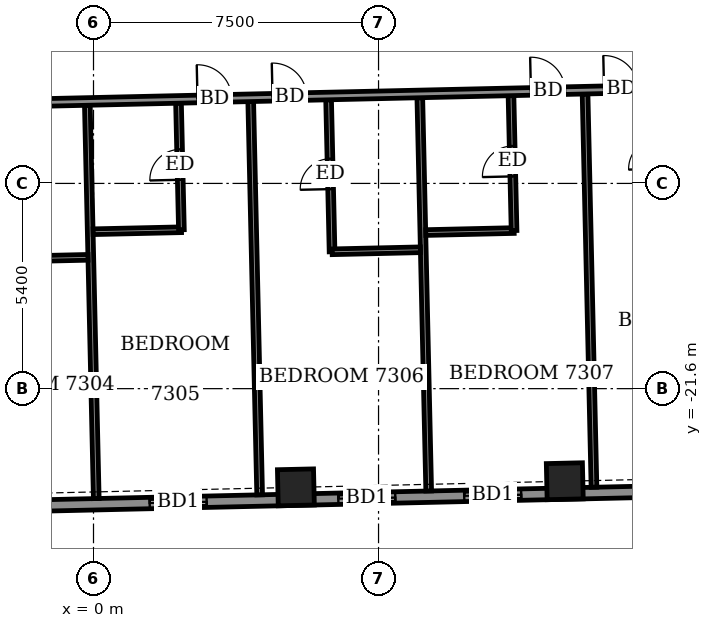
"""IFC4 building model, lengths in metres.
Left out: names, types, materials, properties, quantities, classifications, styles, units other than length and angle.
Written with IfcOpenShell. Run it as: python <this file> out.ifc"""

import sys

from ifc_helpers import new_model, si_unit, direction, frame, frame_2d, origin, origin_2d, place, context, subcontext, project, spatial, rectangle, extrude, element, fill, save


model = new_model("IFC4")
c1 = context("Model", 3, precision=1e-05, world=origin(), true_north=direction((0.0, 1.0)))
c2 = subcontext(c1, "Body", "Model", "MODEL_VIEW")
j1 = project(units=[si_unit("LENGTHUNIT", "METRE"), si_unit("PLANEANGLEUNIT", "RADIAN")], contexts=[c1])
p1 = place(None, origin())
s1 = spatial("IfcSite", under=j1, at=p1, CompositionType="ELEMENT")
p2 = place(p1, origin())
s2 = spatial("IfcBuilding", under=s1, at=p2, CompositionType="ELEMENT")
p3 = place(p2, frame((0.0, 0.0, 287.1)))
s3 = spatial("IfcBuildingStorey", under=s2, at=p3, CompositionType="ELEMENT", Elevation=287.1)
for number, where, z_axis, x_axis in (
    (1, (5.325, -24.197, -0.55), (0.0, 0.0, 1.0), (1.0, 0.023, 0.0)),
    (2, (12.4, -24.036, -0.55), (0.0, 0.0, 1.0), (1.0, 0.023, 0.0)),
):
    element("IfcColumn", number, at=place(p3, frame(where, z_axis=z_axis, x_axis=x_axis)), inside=s3, PredefinedType="COLUMN", context=c2, shape_type="SweptSolid", body=[
        extrude(rectangle(XDim=0.95, YDim=0.95, at=origin_2d()), origin(), (0.0, 0.0, 1.0), 3.6),
    ])
p4 = place(p3, frame((-22.816, -25.161, 0.0), z_axis=(0.0, 0.0, 1.0), x_axis=(0.999742646411, 0.022685699159, 0.0)))
e3 = element("IfcWall", 3, at=p4, inside=s3, PredefinedType="SOLIDWALL", context=c2, shape_type="SweptSolid", body=[
    extrude(rectangle(XDim=49.236, YDim=0.3, at=frame_2d((24.618, 0.0))), origin(), (0.0, 0.0, 1.0), 2.5),
])
p5 = place(p4, frame((2.277, 0.0, 0.0)))
e4 = element("IfcOpeningElement", 4, at=p5, cuts=e3, PredefinedType="OPENING", context=c2, shape_type="SweptSolid", body=[
    extrude(rectangle(XDim=1.5, YDim=2.4, at=frame_2d((0.75, 1.2))), frame((0.0, 0.16, 0.0), z_axis=(0.0, -1.0, 0.0), x_axis=(1.0, 0.0, 0.0)), (0.0, 0.0, 1.0), 0.32),
])
p6 = place(p4, frame((7.726, 0.0, 0.0)))
e5 = element("IfcOpeningElement", 5, at=p6, cuts=e3, PredefinedType="OPENING", context=c2, shape_type="SweptSolid", body=[
    extrude(rectangle(XDim=1.5, YDim=2.4, at=frame_2d((0.75, 1.2))), frame((0.0, 0.16, 0.0), z_axis=(0.0, -1.0, 0.0), x_axis=(1.0, 0.0, 0.0)), (0.0, 0.0, 1.0), 0.32),
])
p7 = place(p4, frame((11.039, 0.0, 0.0)))
e6 = element("IfcOpeningElement", 6, at=p7, cuts=e3, PredefinedType="OPENING", context=c2, shape_type="SweptSolid", body=[
    extrude(rectangle(XDim=1.5, YDim=2.4, at=frame_2d((0.75, 1.2))), frame((0.0, 0.16, 0.0), z_axis=(0.0, -1.0, 0.0), x_axis=(1.0, 0.0, 0.0)), (0.0, 0.0, 1.0), 0.32),
])
p8 = place(p4, frame((15.589, 0.0, 0.0)))
e7 = element("IfcOpeningElement", 7, at=p8, cuts=e3, PredefinedType="OPENING", context=c2, shape_type="SweptSolid", body=[
    extrude(rectangle(XDim=1.5, YDim=2.4, at=frame_2d((0.75, 1.2))), frame((0.0, 0.16, 0.0), z_axis=(0.0, -1.0, 0.0), x_axis=(1.0, 0.0, 0.0)), (0.0, 0.0, 1.0), 0.32),
])
p9 = place(p4, frame((18.903, 0.0, 0.0)))
e8 = element("IfcOpeningElement", 8, at=p9, cuts=e3, PredefinedType="OPENING", context=c2, shape_type="SweptSolid", body=[
    extrude(rectangle(XDim=1.5, YDim=2.4, at=frame_2d((0.75, 1.2))), frame((0.0, 0.16, 0.0), z_axis=(0.0, -1.0, 0.0), x_axis=(1.0, 0.0, 0.0)), (0.0, 0.0, 1.0), 0.32),
])
p10 = place(p4, frame((24.3, 0.0, 0.0)))
e9 = element("IfcOpeningElement", 9, at=p10, cuts=e3, PredefinedType="OPENING", context=c2, shape_type="SweptSolid", body=[
    extrude(rectangle(XDim=1.5, YDim=2.4, at=frame_2d((0.75, 1.2))), frame((0.0, 0.16, 0.0), z_axis=(0.0, -1.0, 0.0), x_axis=(1.0, 0.0, 0.0)), (0.0, 0.0, 1.0), 0.32),
])
p11 = place(p4, frame((29.265, 0.0, 0.0)))
e10 = element("IfcOpeningElement", 10, at=p11, cuts=e3, PredefinedType="OPENING", context=c2, shape_type="SweptSolid", body=[
    extrude(rectangle(XDim=1.5, YDim=2.4, at=frame_2d((0.75, 1.2))), frame((0.0, 0.16, 0.0), z_axis=(0.0, -1.0, 0.0), x_axis=(1.0, 0.0, 0.0)), (0.0, 0.0, 1.0), 0.32),
])
p12 = place(p4, frame((32.579, 0.0, 0.0)))
e11 = element("IfcOpeningElement", 11, at=p12, cuts=e3, PredefinedType="OPENING", context=c2, shape_type="SweptSolid", body=[
    extrude(rectangle(XDim=1.5, YDim=2.4, at=frame_2d((0.75, 1.2))), frame((0.0, 0.16, 0.0), z_axis=(0.0, -1.0, 0.0), x_axis=(1.0, 0.0, 0.0)), (0.0, 0.0, 1.0), 0.32),
])
p13 = place(p4, frame((37.4, 0.0, 0.0)))
e12 = element("IfcOpeningElement", 12, at=p13, cuts=e3, PredefinedType="OPENING", context=c2, shape_type="SweptSolid", body=[
    extrude(rectangle(XDim=1.5, YDim=2.4, at=frame_2d((0.75, 1.2))), frame((0.0, 0.16, 0.0), z_axis=(0.0, -1.0, 0.0), x_axis=(1.0, 0.0, 0.0)), (0.0, 0.0, 1.0), 0.32),
])
p14 = place(p4, frame((42.967, 0.0, 0.0)))
e13 = element("IfcOpeningElement", 13, at=p14, cuts=e3, PredefinedType="OPENING", context=c2, shape_type="SweptSolid", body=[
    extrude(rectangle(XDim=1.2, YDim=2.4, at=frame_2d((0.6, 1.2))), frame((0.0, 0.16, 0.0), z_axis=(0.0, -1.0, 0.0), x_axis=(1.0, 0.0, 0.0)), (0.0, 0.0, 1.0), 0.32),
])
p15 = place(p4, frame((45.421, 0.0, 0.9)))
e14 = element("IfcOpeningElement", 14, at=p15, cuts=e3, PredefinedType="OPENING", context=c2, shape_type="SweptSolid", body=[
    extrude(rectangle(XDim=2.4, YDim=1.5, at=frame_2d((1.2, 0.75))), frame((0.0, 0.16, 0.0), z_axis=(0.0, -1.0, 0.0), x_axis=(1.0, 0.0, 0.0)), (0.0, 0.0, 1.0), 0.32),
])
p16 = place(p3, frame((0.073, -24.492, 0.0), z_axis=(0.0, 0.0, 1.0), x_axis=(-0.022714440015, 0.999741993824, 0.0)))
e15 = element("IfcWall", 15, at=p16, inside=s3, PredefinedType="PARTITIONING", context=c2, shape_type="SweptSolid", body=[
    extrude(rectangle(XDim=10.351, YDim=0.15, at=frame_2d((5.175, 0.0))), origin(), (0.0, 0.0, 1.0), 2.5),
])
p17 = place(p3, frame((4.372, -24.394, 0.0), z_axis=(0.0, 0.0, 1.0), x_axis=(-0.022713904397, 0.999742005993, 0.0)))
e16 = element("IfcWall", 16, at=p17, inside=s3, PredefinedType="PARTITIONING", context=c2, shape_type="SweptSolid", body=[
    extrude(rectangle(XDim=10.351, YDim=0.15, at=frame_2d((5.175, 0.0))), origin(), (0.0, 0.0, 1.0), 2.5),
])
p18 = place(p3, frame((8.82, -24.293, 0.0), z_axis=(0.0, 0.0, 1.0), x_axis=(-0.022622273571, 0.999744083623, 0.0)))
e17 = element("IfcWall", 17, at=p18, inside=s3, PredefinedType="PARTITIONING", context=c2, shape_type="SweptSolid", body=[
    extrude(rectangle(XDim=10.35, YDim=0.15, at=frame_2d((5.175, 0.0))), origin(), (0.0, 0.0, 1.0), 2.5),
])
p19 = place(p3, frame((13.169, -24.194, 0.0), z_axis=(0.0, 0.0, 1.0), x_axis=(-0.022692470342, 0.99974249274, 0.0)))
e18 = element("IfcWall", 18, at=p19, inside=s3, PredefinedType="PARTITIONING", context=c2, shape_type="SweptSolid", body=[
    extrude(rectangle(XDim=10.35, YDim=0.15, at=frame_2d((5.175, 0.0))), origin(), (0.0, 0.0, 1.0), 2.5),
])
p20 = place(p3, frame((-2.469, -18.197, 0.0), z_axis=(0.0, 0.0, 1.0), x_axis=(0.999749954681, 0.022361308448, 0.0)))
e19 = element("IfcWall", 19, at=p20, inside=s3, PredefinedType="PARTITIONING", context=c2, shape_type="SweptSolid", body=[
    extrude(rectangle(XDim=2.325, YDim=0.15, at=frame_2d((1.163, 0.0))), origin(), (0.0, 0.0, 1.0), 3.05),
])
p21 = place(p3, frame((6.277, -17.999, 0.0), z_axis=(0.0, 0.0, 1.0), x_axis=(-0.022765770952, 0.999740826251, 0.0)))
e20 = element("IfcWall", 20, at=p21, inside=s3, PredefinedType="PARTITIONING", context=c2, shape_type="SweptSolid", body=[
    extrude(rectangle(XDim=4.0, YDim=0.15, at=frame_2d((2.0, 0.0))), origin(), (0.0, 0.0, 1.0), 3.05),
])
p22 = place(p21, frame((1.65, 0.0, 0.0)))
e21 = element("IfcOpeningElement", 21, at=p22, cuts=e20, PredefinedType="OPENING", context=c2, shape_type="SweptSolid", body=[
    extrude(rectangle(XDim=0.8, YDim=2.1, at=frame_2d((0.4, 1.05))), frame((0.0, 0.085, 0.0), z_axis=(0.0, -1.0, 0.0), x_axis=(1.0, 0.0, 0.0)), (0.0, 0.0, 1.0), 0.17),
])
p23 = place(p3, frame((6.279, -17.999, 0.0), z_axis=(0.0, 0.0, 1.0), x_axis=(0.999740260747, 0.02279059109, 0.0)))
e22 = element("IfcWall", 22, at=p23, inside=s3, PredefinedType="PARTITIONING", context=c2, shape_type="SweptSolid", body=[
    extrude(rectangle(XDim=2.324, YDim=0.15, at=frame_2d((1.162, 0.0))), origin(), (0.0, 0.0, 1.0), 3.05),
])
p24 = place(p3, frame((8.743, -17.493, 0.0), z_axis=(0.0, 0.0, 1.0), x_axis=(0.99974053329, 0.022778632478, 0.0)))
e23 = element("IfcWall", 23, at=p24, inside=s3, PredefinedType="PARTITIONING", context=c2, shape_type="SweptSolid", body=[
    extrude(rectangle(XDim=2.326, YDim=0.15, at=frame_2d((1.163, 0.0))), origin(), (0.0, 0.0, 1.0), 3.05),
])
p25 = place(p3, frame((11.066, -17.44, 0.0), z_axis=(0.0, 0.0, 1.0), x_axis=(-0.022765149847, 0.999740840394, 0.0)))
e24 = element("IfcWall", 24, at=p25, inside=s3, PredefinedType="PARTITIONING", context=c2, shape_type="SweptSolid", body=[
    extrude(rectangle(XDim=3.55, YDim=0.15, at=frame_2d((1.775, 0.0))), origin(), (0.0, 0.0, 1.0), 3.05),
])
p26 = place(p25, frame((1.425, 0.0, 0.0)))
e25 = element("IfcOpeningElement", 25, at=p26, cuts=e24, PredefinedType="OPENING", context=c2, shape_type="SweptSolid", body=[
    extrude(rectangle(XDim=0.8, YDim=2.1, at=frame_2d((0.4, 1.05))), frame((0.0, 0.085, 0.0), z_axis=(0.0, -1.0, 0.0), x_axis=(1.0, 0.0, 0.0)), (0.0, 0.0, 1.0), 0.17),
])
p27 = place(p3, frame((-0.01, -17.471, 0.0), z_axis=(0.0, 0.0, 1.0), x_axis=(0.999749954681, 0.022361308448, 0.0)))
e26 = element("IfcWall", 26, at=p27, inside=s3, PredefinedType="PARTITIONING", context=c2, shape_type="SweptSolid", body=[
    extrude(rectangle(XDim=2.325, YDim=0.15, at=frame_2d((1.163, 0.0))), origin(), (0.0, 0.0, 1.0), 3.05),
])
p28 = place(p3, frame((2.313, -17.419, 0.0), z_axis=(0.0, 0.0, 1.0), x_axis=(-0.02280301672, 0.999739977408, 0.0)))
e27 = element("IfcWall", 27, at=p28, inside=s3, PredefinedType="PARTITIONING", context=c2, shape_type="SweptSolid", body=[
    extrude(rectangle(XDim=3.33, YDim=0.15, at=frame_2d((1.665, 0.0))), origin(), (0.0, 0.0, 1.0), 3.05),
])
p29 = place(p28, frame((1.315, 0.0, 0.0)))
e28 = element("IfcOpeningElement", 28, at=p29, cuts=e27, PredefinedType="OPENING", context=c2, shape_type="SweptSolid", body=[
    extrude(rectangle(XDim=0.8, YDim=2.1, at=frame_2d((0.4, 1.05))), frame((0.0, 0.085, 0.0), z_axis=(0.0, -1.0, 0.0), x_axis=(1.0, 0.0, 0.0)), (0.0, 0.0, 1.0), 0.17),
])
p30 = place(p3, frame((-25.731, -14.624, 0.0), z_axis=(0.0, 0.0, 1.0), x_axis=(0.999742799525, 0.022678950563, 0.0)))
e29 = element("IfcWall", 29, at=p30, inside=s3, PredefinedType="PARTITIONING", context=c2, shape_type="SweptSolid", body=[
    extrude(rectangle(XDim=55.386, YDim=0.2, at=frame_2d((27.693, 0.0))), origin(), (0.0, 0.0, 1.0), 3.05),
])
p31 = place(p30, frame((3.149, 0.0, 0.0)))
e30 = element("IfcOpeningElement", 30, at=p31, cuts=e29, PredefinedType="OPENING", context=c2, shape_type="SweptSolid", body=[
    extrude(rectangle(XDim=1.0, YDim=2.1, at=frame_2d((0.5, 1.05))), frame((0.0, 0.11, 0.0), z_axis=(0.0, -1.0, 0.0), x_axis=(1.0, 0.0, 0.0)), (0.0, 0.0, 1.0), 0.22),
])
p32 = place(p30, frame((11.1, 0.0, 0.0)))
e31 = element("IfcOpeningElement", 31, at=p32, cuts=e29, PredefinedType="OPENING", context=c2, shape_type="SweptSolid", body=[
    extrude(rectangle(XDim=0.9, YDim=2.1, at=frame_2d((0.45, 1.05))), frame((0.0, 0.11, 0.0), z_axis=(0.0, -1.0, 0.0), x_axis=(1.0, 0.0, 0.0)), (0.0, 0.0, 1.0), 0.22),
])
p33 = place(p30, frame((12.95, 0.0, 0.0)))
e32 = element("IfcOpeningElement", 32, at=p33, cuts=e29, PredefinedType="OPENING", context=c2, shape_type="SweptSolid", body=[
    extrude(rectangle(XDim=0.9, YDim=2.1, at=frame_2d((0.45, 1.05))), frame((0.0, 0.11, 0.0), z_axis=(0.0, -1.0, 0.0), x_axis=(1.0, 0.0, 0.0)), (0.0, 0.0, 1.0), 0.22),
])
p34 = place(p30, frame((19.675, 0.0, 0.0)))
e33 = element("IfcOpeningElement", 33, at=p34, cuts=e29, PredefinedType="OPENING", context=c2, shape_type="SweptSolid", body=[
    extrude(rectangle(XDim=0.9, YDim=2.1, at=frame_2d((0.45, 1.05))), frame((0.0, 0.11, 0.0), z_axis=(0.0, -1.0, 0.0), x_axis=(1.0, 0.0, 0.0)), (0.0, 0.0, 1.0), 0.22),
])
p35 = place(p30, frame((21.7, 0.0, 0.0)))
e34 = element("IfcOpeningElement", 34, at=p35, cuts=e29, PredefinedType="OPENING", context=c2, shape_type="SweptSolid", body=[
    extrude(rectangle(XDim=0.9, YDim=2.1, at=frame_2d((0.45, 1.05))), frame((0.0, 0.11, 0.0), z_axis=(0.0, -1.0, 0.0), x_axis=(1.0, 0.0, 0.0)), (0.0, 0.0, 1.0), 0.22),
])
p36 = place(p30, frame((28.475, 0.0, 0.0)))
e35 = element("IfcOpeningElement", 35, at=p36, cuts=e29, PredefinedType="OPENING", context=c2, shape_type="SweptSolid", body=[
    extrude(rectangle(XDim=0.9, YDim=2.1, at=frame_2d((0.45, 1.05))), frame((0.0, 0.11, 0.0), z_axis=(0.0, -1.0, 0.0), x_axis=(1.0, 0.0, 0.0)), (0.0, 0.0, 1.0), 0.22),
])
p37 = place(p30, frame((30.45, 0.0, 0.0)))
e36 = element("IfcOpeningElement", 36, at=p37, cuts=e29, PredefinedType="OPENING", context=c2, shape_type="SweptSolid", body=[
    extrude(rectangle(XDim=0.9, YDim=2.1, at=frame_2d((0.45, 1.05))), frame((0.0, 0.11, 0.0), z_axis=(0.0, -1.0, 0.0), x_axis=(1.0, 0.0, 0.0)), (0.0, 0.0, 1.0), 0.22),
])
p38 = place(p30, frame((37.25, 0.0, 0.0)))
e37 = element("IfcOpeningElement", 37, at=p38, cuts=e29, PredefinedType="OPENING", context=c2, shape_type="SweptSolid", body=[
    extrude(rectangle(XDim=0.9, YDim=2.1, at=frame_2d((0.45, 1.05))), frame((0.0, 0.11, 0.0), z_axis=(0.0, -1.0, 0.0), x_axis=(1.0, 0.0, 0.0)), (0.0, 0.0, 1.0), 0.22),
])
p39 = place(p30, frame((39.175, 0.0, 0.0)))
e38 = element("IfcOpeningElement", 38, at=p39, cuts=e29, PredefinedType="OPENING", context=c2, shape_type="SweptSolid", body=[
    extrude(rectangle(XDim=0.9, YDim=2.1, at=frame_2d((0.45, 1.05))), frame((0.0, 0.11, 0.0), z_axis=(0.0, -1.0, 0.0), x_axis=(1.0, 0.0, 0.0)), (0.0, 0.0, 1.0), 0.22),
])
p40 = place(p30, frame((45.875, 0.0, 0.0)))
e39 = element("IfcOpeningElement", 39, at=p40, cuts=e29, PredefinedType="OPENING", context=c2, shape_type="SweptSolid", body=[
    extrude(rectangle(XDim=0.9, YDim=2.1, at=frame_2d((0.45, 1.05))), frame((0.0, 0.11, 0.0), z_axis=(0.0, -1.0, 0.0), x_axis=(1.0, 0.0, 0.0)), (0.0, 0.0, 1.0), 0.22),
])
p41 = place(p30, frame((51.127, 0.0, 0.0)))
e40 = element("IfcOpeningElement", 40, at=p41, cuts=e29, PredefinedType="OPENING", context=c2, shape_type="SweptSolid", body=[
    extrude(rectangle(XDim=1.0, YDim=2.1, at=frame_2d((0.5, 1.05))), frame((0.0, 0.11, 0.0), z_axis=(0.0, -1.0, 0.0), x_axis=(1.0, 0.0, 0.0)), (0.0, 0.0, 1.0), 0.22),
])
p42 = place(p10, origin())
e41 = element("IfcDoor", 41, at=p42, inside=s3, OperationType="SLIDING_TO_LEFT", PredefinedType="DOOR", context=c2, shape_type="SweptSolid", body=[
    extrude(rectangle(XDim=1.5, YDim=2.4, at=frame_2d((0.75, 1.2))), frame((0.0, 0.025, 0.0), z_axis=(0.0, -1.0, 0.0), x_axis=(1.0, 0.0, 0.0)), (0.0, 0.0, 1.0), 0.05),
])
fill(e9, e41)
p43 = place(p11, origin())
e42 = element("IfcDoor", 42, at=p43, inside=s3, OperationType="SLIDING_TO_LEFT", PredefinedType="DOOR", context=c2, shape_type="SweptSolid", body=[
    extrude(rectangle(XDim=1.5, YDim=2.4, at=frame_2d((0.75, 1.2))), frame((0.0, 0.025, 0.0), z_axis=(0.0, -1.0, 0.0), x_axis=(1.0, 0.0, 0.0)), (0.0, 0.0, 1.0), 0.05),
])
fill(e10, e42)
p44 = place(p12, origin())
e43 = element("IfcDoor", 43, at=p44, inside=s3, OperationType="SLIDING_TO_LEFT", PredefinedType="DOOR", context=c2, shape_type="SweptSolid", body=[
    extrude(rectangle(XDim=1.5, YDim=2.4, at=frame_2d((0.75, 1.2))), frame((0.0, 0.025, 0.0), z_axis=(0.0, -1.0, 0.0), x_axis=(1.0, 0.0, 0.0)), (0.0, 0.0, 1.0), 0.05),
])
fill(e11, e43)
p45 = place(p36, origin())
e44 = element("IfcDoor", 44, at=p45, inside=s3, OperationType="SINGLE_SWING_LEFT", PredefinedType="DOOR", context=c2, shape_type="SweptSolid", body=[
    extrude(rectangle(XDim=0.9, YDim=2.1, at=frame_2d((0.45, 1.05))), frame((0.0, 0.025, 0.0), z_axis=(0.0, -1.0, 0.0), x_axis=(1.0, 0.0, 0.0)), (0.0, 0.0, 1.0), 0.05),
])
fill(e35, e44)
p46 = place(p29, origin())
e45 = element("IfcDoor", 45, at=p46, inside=s3, OperationType="SINGLE_SWING_LEFT", PredefinedType="DOOR", context=c2, shape_type="SweptSolid", body=[
    extrude(rectangle(XDim=0.8, YDim=2.1, at=frame_2d((0.4, 1.05))), frame((0.0, 0.025, 0.0), z_axis=(0.0, -1.0, 0.0), x_axis=(1.0, 0.0, 0.0)), (0.0, 0.0, 1.0), 0.05),
])
fill(e28, e45)
p47 = place(p37, origin())
e46 = element("IfcDoor", 46, at=p47, inside=s3, OperationType="SINGLE_SWING_RIGHT", PredefinedType="DOOR", context=c2, shape_type="SweptSolid", body=[
    extrude(rectangle(XDim=0.9, YDim=2.1, at=frame_2d((0.45, 1.05))), frame((0.0, 0.025, 0.0), z_axis=(0.0, -1.0, 0.0), x_axis=(1.0, 0.0, 0.0)), (0.0, 0.0, 1.0), 0.05),
])
fill(e36, e46)
p48 = place(p22, origin())
e47 = element("IfcDoor", 47, at=p48, inside=s3, OperationType="SINGLE_SWING_RIGHT", PredefinedType="DOOR", context=c2, shape_type="SweptSolid", body=[
    extrude(rectangle(XDim=0.8, YDim=2.1, at=frame_2d((0.4, 1.05))), frame((0.0, 0.025, 0.0), z_axis=(0.0, -1.0, 0.0), x_axis=(1.0, 0.0, 0.0)), (0.0, 0.0, 1.0), 0.05),
])
fill(e21, e47)
p49 = place(p38, origin())
e48 = element("IfcDoor", 48, at=p49, inside=s3, OperationType="SINGLE_SWING_LEFT", PredefinedType="DOOR", context=c2, shape_type="SweptSolid", body=[
    extrude(rectangle(XDim=0.9, YDim=2.1, at=frame_2d((0.45, 1.05))), frame((0.0, 0.025, 0.0), z_axis=(0.0, -1.0, 0.0), x_axis=(1.0, 0.0, 0.0)), (0.0, 0.0, 1.0), 0.05),
])
fill(e37, e48)
p50 = place(p26, origin())
e49 = element("IfcDoor", 49, at=p50, inside=s3, OperationType="SINGLE_SWING_LEFT", PredefinedType="DOOR", context=c2, shape_type="SweptSolid", body=[
    extrude(rectangle(XDim=0.8, YDim=2.1, at=frame_2d((0.4, 1.05))), frame((0.0, 0.025, 0.0), z_axis=(0.0, -1.0, 0.0), x_axis=(1.0, 0.0, 0.0)), (0.0, 0.0, 1.0), 0.05),
])
fill(e25, e49)
p51 = place(p39, origin())
e50 = element("IfcDoor", 50, at=p51, inside=s3, OperationType="SINGLE_SWING_RIGHT", PredefinedType="DOOR", context=c2, shape_type="SweptSolid", body=[
    extrude(rectangle(XDim=0.9, YDim=2.1, at=frame_2d((0.45, 1.05))), frame((0.0, 0.025, 0.0), z_axis=(0.0, -1.0, 0.0), x_axis=(1.0, 0.0, 0.0)), (0.0, 0.0, 1.0), 0.05),
])
fill(e38, e50)
save(model, sys.argv[1])
